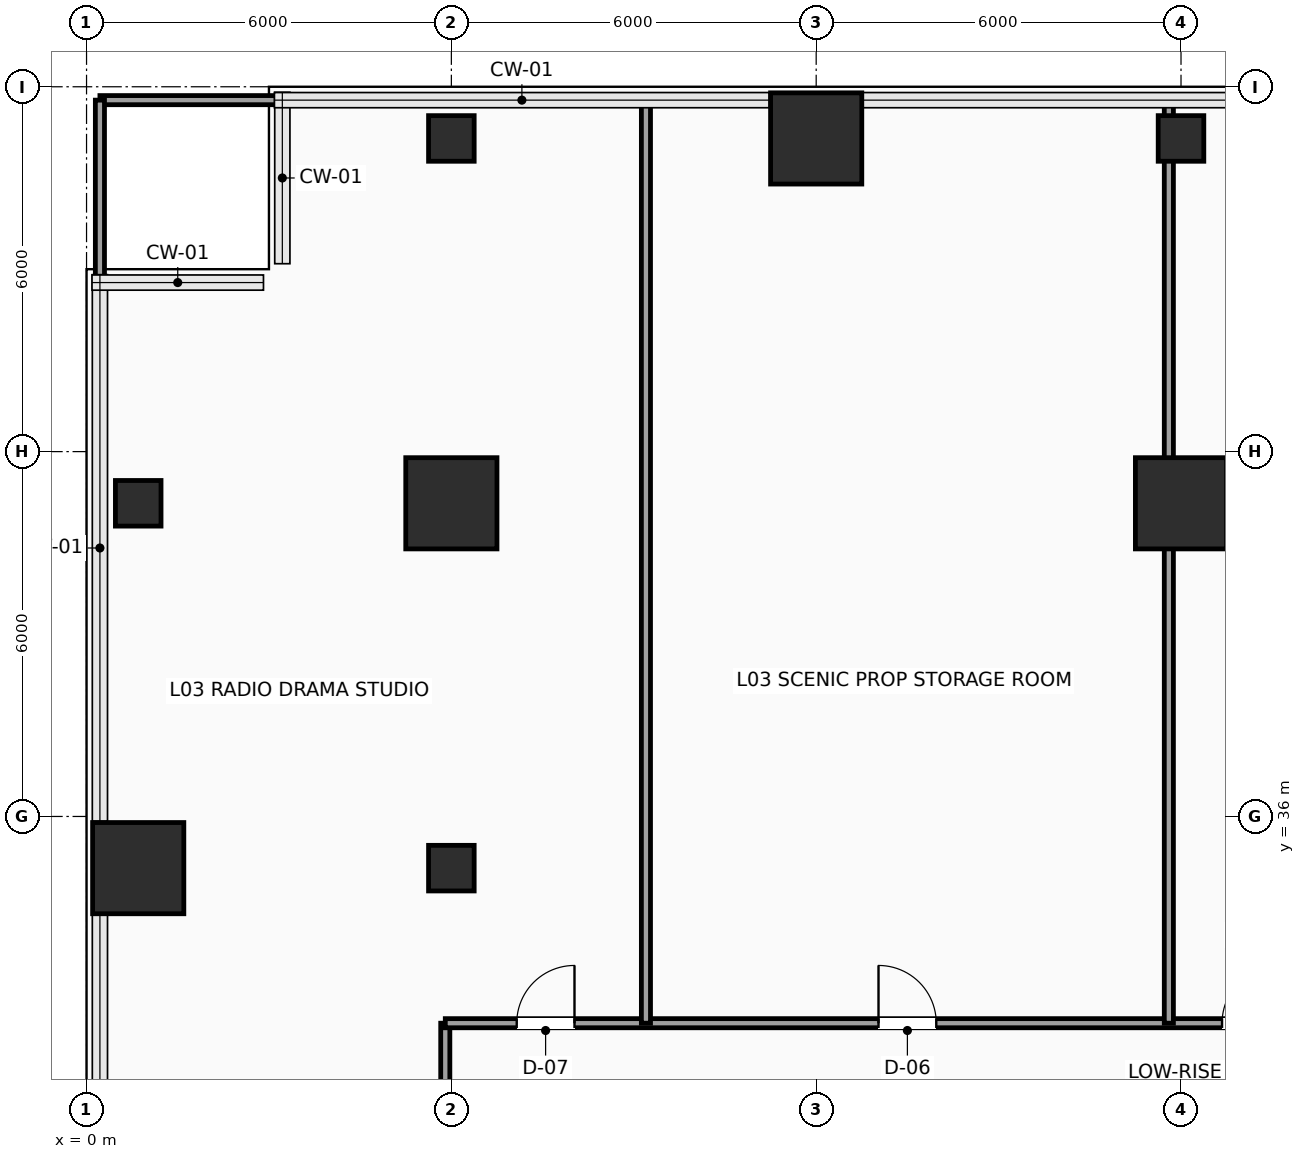
"""IFC4 building model, lengths in metres.
Left out: names, types, materials, properties, quantities, classifications, styles, units other than length and angle.
Written with IfcOpenShell. Run it as: python <this file> out.ifc"""

import sys

from ifc_helpers import new_model, si_unit, direction, frame, frame_2d, origin, origin_2d, place, context, subcontext, project, spatial, rectangle, hollow_rectangle, extrude, element, fill, save


model = new_model("IFC4")
c1 = context("Model", 3, precision=1e-05, world=origin(), true_north=direction((0.0, 1.0)))
c2 = subcontext(c1, "Body", "Model", "MODEL_VIEW")
j1 = project(units=[si_unit("LENGTHUNIT", "METRE"), si_unit("PLANEANGLEUNIT", "RADIAN")], contexts=[c1])
p1 = place(None, origin())
s1 = spatial("IfcSite", under=j1, at=p1, CompositionType="ELEMENT")
p2 = place(p1, origin())
s2 = spatial("IfcBuilding", under=s1, at=p2, CompositionType="ELEMENT")
p3 = place(p2, frame((0.0, 0.0, 16.5)))
s3 = spatial("IfcBuildingStorey", under=s2, at=p3, CompositionType="ELEMENT", Elevation=16.5)
p4 = place(p3, frame((0.85, 35.15, 0.0), z_axis=(0.0, 0.0, 1.0), x_axis=(1.0, 0.0, 0.0)))
e1 = element("IfcColumn", 1, at=p4, inside=s3, PredefinedType="COLUMN", context=c2, shape_type="SweptSolid", body=[
    extrude(rectangle(XDim=1.5, YDim=1.5, at=origin_2d()), origin(), (0.0, 0.0, 1.0), 5.4),
])
for number, where, z_axis, x_axis in (
    (2, (0.85, 41.15, 0.0), (0.0, 0.0, 1.0), (1.0, 0.0, 0.0)),
    (3, (6.0, 35.15, 0.0), (0.0, 0.0, 1.0), (1.0, 0.0, 0.0)),
):
    element("IfcColumn", number, at=place(p3, frame(where, z_axis=z_axis, x_axis=x_axis)), inside=s3, PredefinedType="COLUMN", context=c2, shape_type="SweptSolid", body=[
        extrude(hollow_rectangle(XDim=0.75, YDim=0.75, WallThickness=0.035, InnerFilletRadius=0.035, OuterFilletRadius=0.05, at=origin_2d()), origin(), (0.0, 0.0, 1.0), 5.4),
    ])
p5 = place(p3, frame((6.0, 41.15, 0.0), z_axis=(0.0, 0.0, 1.0), x_axis=(1.0, 0.0, 0.0)))
e4 = element("IfcColumn", 4, at=p5, inside=s3, PredefinedType="COLUMN", context=c2, shape_type="SweptSolid", body=[
    extrude(rectangle(XDim=1.5, YDim=1.5, at=origin_2d()), origin(), (0.0, 0.0, 1.0), 5.4),
])
p6 = place(p3, frame((6.0, 47.15, 0.0), z_axis=(0.0, 0.0, 1.0), x_axis=(1.0, 0.0, 0.0)))
e5 = element("IfcColumn", 5, at=p6, inside=s3, PredefinedType="COLUMN", context=c2, shape_type="SweptSolid", body=[
    extrude(hollow_rectangle(XDim=0.75, YDim=0.75, WallThickness=0.035, InnerFilletRadius=0.035, OuterFilletRadius=0.05, at=origin_2d()), origin(), (0.0, 0.0, 1.0), 5.4),
])
for number, where, z_axis, x_axis in (
    (6, (12.0, 47.15, 0.0), (0.0, 0.0, 1.0), (1.0, 0.0, 0.0)),
    (7, (18.0, 41.15, 0.0), (0.0, 0.0, 1.0), (1.0, 0.0, 0.0)),
):
    element("IfcColumn", number, at=place(p3, frame(where, z_axis=z_axis, x_axis=x_axis)), inside=s3, PredefinedType="COLUMN", context=c2, shape_type="SweptSolid", body=[
        extrude(rectangle(XDim=1.5, YDim=1.5, at=origin_2d()), origin(), (0.0, 0.0, 1.0), 5.4),
    ])
p7 = place(p3, frame((18.0, 47.15, 0.0), z_axis=(0.0, 0.0, 1.0), x_axis=(1.0, 0.0, 0.0)))
e8 = element("IfcColumn", 8, at=p7, inside=s3, PredefinedType="COLUMN", context=c2, shape_type="SweptSolid", body=[
    extrude(hollow_rectangle(XDim=0.75, YDim=0.75, WallThickness=0.035, InnerFilletRadius=0.035, OuterFilletRadius=0.05, at=origin_2d()), origin(), (0.0, 0.0, 1.0), 5.4),
])
p8 = place(p3, frame((5.9, 30.2, 0.0), z_axis=(0.0, 0.0, 1.0), x_axis=(0.0, 1.0, 0.0)))
e9 = element("IfcWall", 9, at=p8, inside=s3, PredefinedType="PARTITIONING", context=c2, shape_type="SweptSolid", body=[
    extrude(rectangle(XDim=2.4, YDim=0.15, at=frame_2d((1.2, 0.0))), origin(), (0.0, 0.0, 1.0), 4.467),
])
p9 = place(p3, frame((5.9, 32.6, 0.0), z_axis=(0.0, 0.0, 1.0), x_axis=(1.0, 0.0, 0.0)))
e10 = element("IfcWall", 10, at=p9, inside=s3, PredefinedType="PARTITIONING", context=c2, shape_type="SweptSolid", body=[
    extrude(rectangle(XDim=14.6, YDim=0.15, at=frame_2d((7.3, 0.0))), origin(), (0.0, 0.0, 1.0), 5.125),
])
p10 = place(p9, frame((1.175, 0.0, 0.0)))
e11 = element("IfcOpeningElement", 11, at=p10, cuts=e10, PredefinedType="OPENING", context=c2, shape_type="SweptSolid", body=[
    extrude(rectangle(XDim=0.95, YDim=2.15, at=frame_2d((0.475, 1.075))), frame((0.0, 0.085, 0.0), z_axis=(0.0, -1.0, 0.0), x_axis=(1.0, 0.0, 0.0)), (0.0, 0.0, 1.0), 0.17),
])
p11 = place(p9, frame((7.125, 0.0, 0.0)))
e12 = element("IfcOpeningElement", 12, at=p11, cuts=e10, PredefinedType="OPENING", context=c2, shape_type="SweptSolid", body=[
    extrude(rectangle(XDim=0.95, YDim=2.15, at=frame_2d((0.475, 1.075))), frame((0.0, 0.085, 0.0), z_axis=(0.0, -1.0, 0.0), x_axis=(1.0, 0.0, 0.0)), (0.0, 0.0, 1.0), 0.17),
])
p12 = place(p9, frame((12.775, 0.0, 0.0)))
e13 = element("IfcOpeningElement", 13, at=p12, cuts=e10, PredefinedType="OPENING", context=c2, shape_type="SweptSolid", body=[
    extrude(rectangle(XDim=0.95, YDim=2.15, at=frame_2d((0.475, 1.075))), frame((0.0, 0.085, 0.0), z_axis=(0.0, -1.0, 0.0), x_axis=(1.0, 0.0, 0.0)), (0.0, 0.0, 1.0), 0.17),
])
p13 = place(p3, frame((0.22, 47.78, 0.0), z_axis=(0.0, 0.0, 1.0), x_axis=(1.0, 0.0, 0.0)))
e14 = element("IfcWall", 14, at=p13, inside=s3, PredefinedType="PARTITIONING", context=c2, shape_type="SweptSolid", body=[
    extrude(rectangle(XDim=8.98, YDim=0.15, at=frame_2d((4.49, 0.0))), origin(), (0.0, 0.0, 1.0), 5.125),
])
for number, where, z_axis, x_axis in (
    (15, (0.22, 32.6, 0.0), (0.0, 0.0, 1.0), (0.0, 1.0, 0.0)),
    (16, (9.2, 32.6, 0.0), (0.0, 0.0, 1.0), (0.0, 1.0, 0.0)),
):
    element("IfcWall", number, at=place(p3, frame(where, z_axis=z_axis, x_axis=x_axis)), inside=s3, PredefinedType="PARTITIONING", context=c2, shape_type="SweptSolid", body=[
        extrude(rectangle(XDim=15.18, YDim=0.15, at=frame_2d((7.59, 0.0))), origin(), (0.0, 0.0, 1.0), 5.125),
    ])
p14 = place(p3, frame((17.8, 32.6, 0.0), z_axis=(0.0, 0.0, 1.0), x_axis=(0.0, 1.0, 0.0)))
e17 = element("IfcWall", 17, at=p14, inside=s3, PredefinedType="PARTITIONING", context=c2, shape_type="SweptSolid", body=[
    extrude(rectangle(XDim=15.18, YDim=0.15, at=frame_2d((7.59, 0.0))), origin(), (0.0, 0.0, 1.0), 4.217),
])
p15 = place(p10, origin())
e18 = element("IfcDoor", 18, at=p15, inside=s3, OperationType="SINGLE_SWING_RIGHT", PredefinedType="DOOR", context=c2, shape_type="SweptSolid", body=[
    extrude(rectangle(XDim=0.95, YDim=2.15, at=frame_2d((0.475, 1.075))), frame((0.0, 0.025, 0.0), z_axis=(0.0, -1.0, 0.0), x_axis=(1.0, 0.0, 0.0)), (0.0, 0.0, 1.0), 0.05),
])
fill(e11, e18)
p16 = place(p11, origin())
e19 = element("IfcDoor", 19, at=p16, inside=s3, OperationType="SINGLE_SWING_LEFT", PredefinedType="DOOR", context=c2, shape_type="SweptSolid", body=[
    extrude(rectangle(XDim=0.95, YDim=2.15, at=frame_2d((0.475, 1.075))), frame((0.0, 0.025, 0.0), z_axis=(0.0, -1.0, 0.0), x_axis=(1.0, 0.0, 0.0)), (0.0, 0.0, 1.0), 0.05),
])
fill(e12, e19)
p17 = place(p12, origin())
e20 = element("IfcDoor", 20, at=p17, inside=s3, OperationType="SINGLE_SWING_RIGHT", PredefinedType="DOOR", context=c2, shape_type="SweptSolid", body=[
    extrude(rectangle(XDim=0.95, YDim=2.15, at=frame_2d((0.475, 1.075))), frame((0.0, 0.025, 0.0), z_axis=(0.0, -1.0, 0.0), x_axis=(1.0, 0.0, 0.0)), (0.0, 0.0, 1.0), 0.05),
])
fill(e13, e20)
save(model, sys.argv[1])
